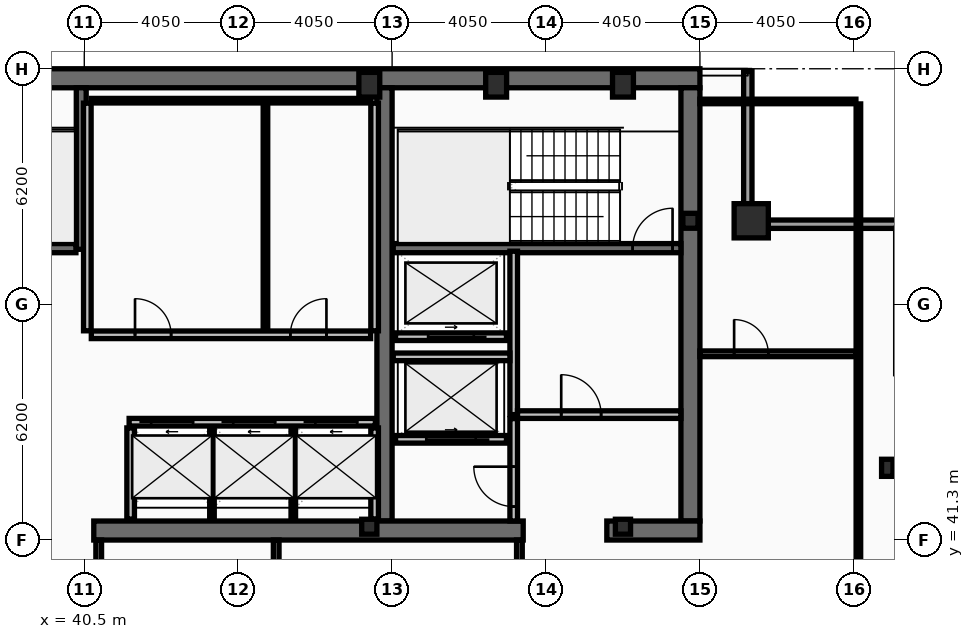
"""IFC4 building model, lengths in metres.
Left out: names, types, materials, properties, quantities, classifications, styles, units other than length and angle.
Written with IfcOpenShell. Run it as: python <this file> out.ifc"""

import sys

from ifc_helpers import new_model, si_unit, direction, frame, frame_2d, origin, origin_2d, place, context, subcontext, project, spatial, rectangle, hollow_rectangle, i_section, extrude, element, fill, save


model = new_model("IFC4")
c1 = context("Model", 3, precision=1e-05, world=origin(), true_north=direction((0.0, 1.0)))
c2 = subcontext(c1, "Body", "Model", "MODEL_VIEW")
j1 = project(units=[si_unit("LENGTHUNIT", "METRE"), si_unit("PLANEANGLEUNIT", "RADIAN")], contexts=[c1])
p1 = place(None, origin())
s1 = spatial("IfcSite", under=j1, at=p1, CompositionType="ELEMENT")
p2 = place(p1, origin())
s2 = spatial("IfcBuilding", under=s1, at=p2, CompositionType="ELEMENT")
p3 = place(p2, frame((0.0, 0.0, 343.4)))
s3 = spatial("IfcBuildingStorey", under=s2, at=p3, CompositionType="ELEMENT", Elevation=343.4)
p4 = place(p3, frame((16.2, 53.45, 0.0), z_axis=(0.0, 0.0, 1.0), x_axis=(1.0, 0.0, 0.0)))
e1 = element("IfcWall", 1, at=p4, inside=s3, PredefinedType="SHEAR", context=c2, shape_type="SweptSolid", body=[
    extrude(rectangle(XDim=40.5, YDim=0.5, at=frame_2d((20.25, 0.0))), origin(), (0.0, 0.0, 1.0), 3.44),
])
p5 = place(p3, frame((56.45, 53.2, 0.0), z_axis=(0.0, 0.0, 1.0), x_axis=(0.0, -1.0, 0.0)))
e2 = element("IfcWall", 2, at=p5, inside=s3, PredefinedType="SHEAR", context=c2, shape_type="SweptSolid", body=[
    extrude(rectangle(XDim=11.4, YDim=0.5, at=frame_2d((5.7, 0.0))), origin(), (0.0, 0.0, 1.0), 3.44),
])
p6 = place(p3, frame((48.4, 41.8, 0.0), z_axis=(0.0, 0.0, 1.0), x_axis=(0.0, 1.0, 0.0)))
e3 = element("IfcWall", 3, at=p6, inside=s3, PredefinedType="SHEAR", context=c2, shape_type="SweptSolid", body=[
    extrude(rectangle(XDim=11.4, YDim=0.4, at=frame_2d((5.7, 0.0))), origin(), (0.0, 0.0, 1.0), 3.44),
])
p7 = place(p3, frame((52.05, 41.55, 0.0), z_axis=(0.0, 0.0, 1.0), x_axis=(-1.0, 0.0, 0.0)))
e4 = element("IfcWall", 4, at=p7, inside=s3, PredefinedType="SHEAR", context=c2, shape_type="SweptSolid", body=[
    extrude(rectangle(XDim=11.3, YDim=0.5, at=frame_2d((5.65, 0.0))), origin(), (0.0, 0.0, 1.0), 3.44),
])
p8 = place(p3, frame((56.7, 41.55, 0.0), z_axis=(0.0, 0.0, 1.0), x_axis=(-1.0, 0.0, 0.0)))
e5 = element("IfcWall", 5, at=p8, inside=s3, PredefinedType="SHEAR", context=c2, shape_type="SweptSolid", body=[
    extrude(rectangle(XDim=2.45, YDim=0.5, at=frame_2d((1.225, 0.0))), origin(), (0.0, 0.0, 1.0), 3.44),
])
p9 = place(p3, frame((40.42, 48.95, 0.0), z_axis=(0.0, 0.0, 1.0), x_axis=(0.0, 1.0, 0.0)))
e6 = element("IfcWall", 6, at=p9, inside=s3, PredefinedType="SHEAR", context=c2, shape_type="SweptSolid", body=[
    extrude(rectangle(XDim=4.25, YDim=0.26, at=frame_2d((2.125, 0.0))), origin(), (0.0, 0.0, 1.0), 3.44),
])
p10 = place(p3, frame((48.63, 48.98, 0.0), z_axis=(0.0, 0.0, 1.0), x_axis=(1.0, 0.0, 0.0)))
e7 = element("IfcWall", 7, at=p10, inside=s3, PredefinedType="SHEAR", context=c2, shape_type="SweptSolid", body=[
    extrude(rectangle(XDim=7.57, YDim=0.24, at=frame_2d((3.785, 0.0))), origin(), (0.0, 0.0, 1.0), 3.44),
])
p11 = place(p10, frame((6.3, 0.0, 0.0)))
e8 = element("IfcOpeningElement", 8, at=p11, cuts=e7, PredefinedType="OPENING", context=c2, shape_type="SweptSolid", body=[
    extrude(rectangle(XDim=1.05, YDim=2.15, at=frame_2d((0.525, 1.075))), frame((0.0, 0.13, 0.0), z_axis=(0.0, -1.0, 0.0), x_axis=(1.0, 0.0, 0.0)), (0.0, 0.0, 1.0), 0.26),
])
p12 = place(p3, frame((32.72, 48.98, 0.0), z_axis=(0.0, 0.0, 1.0), x_axis=(1.0, 0.0, 0.0)))
e9 = element("IfcWall", 9, at=p12, inside=s3, PredefinedType="SHEAR", context=c2, shape_type="SweptSolid", body=[
    extrude(rectangle(XDim=7.56, YDim=0.24, at=frame_2d((3.78, 0.0))), origin(), (0.0, 0.0, 1.0), 3.44),
])
p13 = place(p12, frame((0.22, 0.0, 0.0)))
e10 = element("IfcOpeningElement", 10, at=p13, cuts=e9, PredefinedType="OPENING", context=c2, shape_type="SweptSolid", body=[
    extrude(rectangle(XDim=1.05, YDim=2.15, at=frame_2d((0.525, 1.075))), frame((0.0, 0.13, 0.0), z_axis=(0.0, -1.0, 0.0), x_axis=(1.0, 0.0, 0.0)), (0.0, 0.0, 1.0), 0.26),
])
p14 = place(p3, frame((58.05, 49.7, 0.0), z_axis=(0.0, 0.0, 1.0), x_axis=(1.0, 0.0, 0.0)))
e11 = element("IfcColumn", 11, at=p14, inside=s3, PredefinedType="COLUMN", context=c2, shape_type="SweptSolid", body=[
    extrude(hollow_rectangle(XDim=0.9, YDim=0.9, WallThickness=0.05, at=origin_2d()), origin(), (0.0, 0.0, 1.0), 3.6),
])
for number, where, z_axis, x_axis in (
    (12, (48.0, 53.28, 0.0), (0.0, 0.0, 1.0), (1.0, 0.0, 0.0)),
    (13, (51.337, 53.28, 0.0), (0.0, 0.0, 1.0), (1.0, 0.0, 0.0)),
    (14, (54.675, 53.28, 0.0), (0.0, 0.0, 1.0), (1.0, 0.0, 0.0)),
):
    element("IfcColumn", number, at=place(p3, frame(where, z_axis=z_axis, x_axis=x_axis)), inside=s3, PredefinedType="COLUMN", context=c2, shape_type="SweptSolid", body=[
        extrude(hollow_rectangle(XDim=0.55, YDim=0.65, WallThickness=0.04, at=origin_2d()), origin(), (0.0, 0.0, 1.0), 3.6),
    ])
p15 = place(p3, frame((61.63, 43.2, 0.0), z_axis=(0.0, 0.0, 1.0), x_axis=(1.0, 0.0, 0.0)))
e15 = element("IfcColumn", 15, at=p15, inside=s3, PredefinedType="COLUMN", context=c2, shape_type="SweptSolid", body=[
    extrude(i_section(OverallWidth=0.3, OverallDepth=0.45, WebThickness=0.014, FlangeThickness=0.026, at=origin_2d()), origin(), (0.0, 0.0, 1.0), 3.6),
])
for number, where, z_axis, x_axis in (
    (16, (56.45, 49.7, 0.0), (0.0, 0.0, 1.0), (1.0, 0.0, 0.0)),
    (17, (48.0, 41.65, 0.0), (0.0, 0.0, 1.0), (1.0, 0.0, 0.0)),
    (18, (54.675, 41.65, 0.0), (0.0, 0.0, 1.0), (1.0, 0.0, 0.0)),
):
    element("IfcColumn", number, at=place(p3, frame(where, z_axis=z_axis, x_axis=x_axis)), inside=s3, PredefinedType="COLUMN", context=c2, shape_type="SweptSolid", body=[
        extrude(i_section(OverallWidth=0.399, OverallDepth=0.393, WebThickness=0.023, FlangeThickness=0.037, at=origin_2d()), origin(), (0.0, 0.0, 1.0), 3.6),
    ])
p16 = place(p3, frame((57.96, 53.63, 0.0), z_axis=(0.0, 0.0, 1.0), x_axis=(0.0, -1.0, 0.0)))
e19 = element("IfcWall", 19, at=p16, inside=s3, PredefinedType="SOLIDWALL", context=c2, shape_type="SweptSolid", body=[
    extrude(rectangle(XDim=3.91, YDim=0.22, at=frame_2d((1.955, 0.0))), origin(), (0.0, 0.0, 1.0), 2.88),
])
p17 = place(p3, frame((57.85, 49.61, 0.0), z_axis=(0.0, 0.0, 1.0), x_axis=(1.0, 0.0, 0.0)))
e20 = element("IfcWall", 20, at=p17, inside=s3, PredefinedType="SOLIDWALL", context=c2, shape_type="SweptSolid", body=[
    extrude(rectangle(XDim=4.22, YDim=0.22, at=frame_2d((2.11, 0.0))), origin(), (0.0, 0.0, 1.0), 2.88),
])
p18 = place(p3, frame((41.68, 44.4, 0.0), z_axis=(0.0, 0.0, 1.0), x_axis=(1.0, 0.0, 0.0)))
e21 = element("IfcWall", 21, at=p18, inside=s3, PredefinedType="PARTITIONING", context=c2, shape_type="SweptSolid", body=[
    extrude(rectangle(XDim=6.48, YDim=0.2, at=frame_2d((3.24, 0.0))), origin(), (0.0, 0.0, 1.0), 3.44),
])
p19 = place(p18, frame((0.58, 0.0, 0.0)))
e22 = element("IfcOpeningElement", 22, at=p19, cuts=e21, PredefinedType="OPENING", context=c2, shape_type="SweptSolid", body=[
    extrude(rectangle(XDim=1.1, YDim=2.18, at=frame_2d((0.55, 1.09))), frame((0.0, 0.11, 0.0), z_axis=(0.0, -1.0, 0.0), x_axis=(1.0, 0.0, 0.0)), (0.0, 0.0, 1.0), 0.22),
])
p20 = place(p18, frame((2.74, 0.0, 0.0)))
e23 = element("IfcOpeningElement", 23, at=p20, cuts=e21, PredefinedType="OPENING", context=c2, shape_type="SweptSolid", body=[
    extrude(rectangle(XDim=1.1, YDim=2.18, at=frame_2d((0.55, 1.09))), frame((0.0, 0.11, 0.0), z_axis=(0.0, -1.0, 0.0), x_axis=(1.0, 0.0, 0.0)), (0.0, 0.0, 1.0), 0.22),
])
p21 = place(p18, frame((4.9, 0.0, 0.0)))
e24 = element("IfcOpeningElement", 24, at=p21, cuts=e21, PredefinedType="OPENING", context=c2, shape_type="SweptSolid", body=[
    extrude(rectangle(XDim=1.1, YDim=2.18, at=frame_2d((0.55, 1.09))), frame((0.0, 0.11, 0.0), z_axis=(0.0, -1.0, 0.0), x_axis=(1.0, 0.0, 0.0)), (0.0, 0.0, 1.0), 0.22),
])
p22 = place(p3, frame((51.61, 43.95, 0.0), z_axis=(0.0, 0.0, 1.0), x_axis=(-1.0, 0.0, 0.0)))
e25 = element("IfcWall", 25, at=p22, inside=s3, PredefinedType="PARTITIONING", context=c2, shape_type="SweptSolid", body=[
    extrude(rectangle(XDim=2.92, YDim=0.2, at=frame_2d((1.46, 0.0))), origin(), (0.0, 0.0, 1.0), 3.44),
])
p23 = place(p22, frame((0.81, 0.0, 0.0)))
e26 = element("IfcOpeningElement", 26, at=p23, cuts=e25, PredefinedType="OPENING", context=c2, shape_type="SweptSolid", body=[
    extrude(rectangle(XDim=1.3, YDim=2.18, at=frame_2d((0.65, 1.09))), frame((0.0, 0.11, 0.0), z_axis=(0.0, -1.0, 0.0), x_axis=(1.0, 0.0, 0.0)), (0.0, 0.0, 1.0), 0.22),
])
p24 = place(p3, frame((51.61, 46.65, 0.0), z_axis=(0.0, 0.0, 1.0), x_axis=(-1.0, 0.0, 0.0)))
e27 = element("IfcWall", 27, at=p24, inside=s3, PredefinedType="PARTITIONING", context=c2, shape_type="SweptSolid", body=[
    extrude(rectangle(XDim=2.92, YDim=0.2, at=frame_2d((1.46, 0.0))), origin(), (0.0, 0.0, 1.0), 3.44),
])
p25 = place(p24, frame((0.86, 0.0, 0.0)))
e28 = element("IfcOpeningElement", 28, at=p25, cuts=e27, PredefinedType="OPENING", context=c2, shape_type="SweptSolid", body=[
    extrude(rectangle(XDim=1.2, YDim=2.18, at=frame_2d((0.6, 1.09))), frame((0.0, 0.11, 0.0), z_axis=(0.0, -1.0, 0.0), x_axis=(1.0, 0.0, 0.0)), (0.0, 0.0, 1.0), 0.22),
])
p26 = place(p3, frame((51.8, 44.6, 0.0), z_axis=(0.0, 0.0, 1.0), x_axis=(0.0, 1.0, 0.0)))
e29 = element("IfcWall", 29, at=p26, inside=s3, PredefinedType="PARTITIONING", context=c2, shape_type="SweptSolid", body=[
    extrude(rectangle(XDim=4.3, YDim=0.2, at=frame_2d((2.15, 0.0))), origin(), (0.0, 0.0, 1.0), 3.44),
])
p27 = place(p3, frame((51.9, 44.6, 0.0), z_axis=(0.0, 0.0, 1.0), x_axis=(1.0, 0.0, 0.0)))
e30 = element("IfcWall", 30, at=p27, inside=s3, PredefinedType="PARTITIONING", context=c2, shape_type="SweptSolid", body=[
    extrude(rectangle(XDim=4.3, YDim=0.2, at=frame_2d((2.15, 0.0))), origin(), (0.0, 0.0, 1.0), 3.44),
])
p28 = place(p27, frame((1.15, 0.0, 0.0)))
e31 = element("IfcOpeningElement", 31, at=p28, cuts=e30, PredefinedType="OPENING", context=c2, shape_type="SweptSolid", body=[
    extrude(rectangle(XDim=1.05, YDim=2.15, at=frame_2d((0.525, 1.075))), frame((0.0, 0.11, 0.0), z_axis=(0.0, -1.0, 0.0), x_axis=(1.0, 0.0, 0.0)), (0.0, 0.0, 1.0), 0.22),
])
p29 = place(p3, frame((48.63, 46.12, 0.0), z_axis=(0.0, 0.0, 1.0), x_axis=(1.0, 0.0, 0.0)))
e32 = element("IfcWall", 32, at=p29, inside=s3, PredefinedType="PARTITIONING", context=c2, shape_type="SweptSolid", body=[
    extrude(rectangle(XDim=3.07, YDim=0.2, at=frame_2d((1.535, 0.0))), origin(), (0.0, 0.0, 1.0), 3.44),
])
p30 = place(p3, frame((51.8, 41.8, 0.0), z_axis=(0.0, 0.0, 1.0), x_axis=(0.0, 1.0, 0.0)))
e33 = element("IfcWall", 33, at=p30, inside=s3, PredefinedType="PARTITIONING", context=c2, shape_type="SweptSolid", body=[
    extrude(rectangle(XDim=2.695, YDim=0.2, at=frame_2d((1.348, 0.0))), origin(), (0.0, 0.0, 1.0), 3.44),
])
p31 = place(p30, frame((0.38, 0.0, 0.0)))
e34 = element("IfcOpeningElement", 34, at=p31, cuts=e33, PredefinedType="OPENING", context=c2, shape_type="SweptSolid", body=[
    extrude(rectangle(XDim=1.05, YDim=2.15, at=frame_2d((0.525, 1.075))), frame((0.0, 0.11, 0.0), z_axis=(0.0, -1.0, 0.0), x_axis=(1.0, 0.0, 0.0)), (0.0, 0.0, 1.0), 0.22),
])
for number, where, z_axis, x_axis in (
    (35, (40.58, 46.805, 0.0), (0.0, 0.0, 1.0), (0.0, 1.0, 0.0)),
    (36, (48.14, 46.805, 0.0), (0.0, 0.0, 1.0), (0.0, 1.0, 0.0)),
):
    element("IfcWall", number, at=place(p3, frame(where, z_axis=z_axis, x_axis=x_axis)), inside=s3, PredefinedType="PARTITIONING", context=c2, shape_type="SweptSolid", body=[
        extrude(rectangle(XDim=5.99, YDim=0.2, at=frame_2d((2.995, 0.0))), origin(), (0.0, 0.0, 1.0), 3.44),
    ])
p32 = place(p3, frame((40.685, 52.86, 0.0), z_axis=(0.0, 0.0, 1.0), x_axis=(1.0, 0.0, 0.0)))
e37 = element("IfcWall", 37, at=p32, inside=s3, PredefinedType="PARTITIONING", context=c2, shape_type="SweptSolid", body=[
    extrude(rectangle(XDim=7.35, YDim=0.12, at=frame_2d((3.675, 0.0))), origin(), (0.0, 0.0, 1.0), 3.44),
])
p33 = place(p3, frame((45.267, 46.805, 0.0), z_axis=(0.0, 0.0, 1.0), x_axis=(0.0, 1.0, 0.0)))
e38 = element("IfcWall", 38, at=p33, inside=s3, PredefinedType="PARTITIONING", context=c2, shape_type="SweptSolid", body=[
    extrude(rectangle(XDim=5.99, YDim=0.12, at=frame_2d((2.995, 0.0))), origin(), (0.0, 0.0, 1.0), 3.44),
])
p34 = place(p3, frame((40.685, 46.7, 0.0), z_axis=(0.0, 0.0, 1.0), x_axis=(1.0, 0.0, 0.0)))
e39 = element("IfcWall", 39, at=p34, inside=s3, PredefinedType="PARTITIONING", context=c2, shape_type="SweptSolid", body=[
    extrude(rectangle(XDim=7.35, YDim=0.2, at=frame_2d((3.675, 0.0))), origin(), (0.0, 0.0, 1.0), 3.44),
])
p35 = place(p34, frame((1.15, 0.0, 0.0)))
e40 = element("IfcOpeningElement", 40, at=p35, cuts=e39, PredefinedType="OPENING", context=c2, shape_type="SweptSolid", body=[
    extrude(rectangle(XDim=0.95, YDim=2.1, at=frame_2d((0.475, 1.05))), frame((0.0, 0.11, 0.0), z_axis=(0.0, -1.0, 0.0), x_axis=(1.0, 0.0, 0.0)), (0.0, 0.0, 1.0), 0.22),
])
p36 = place(p34, frame((5.237, 0.0, 0.0)))
e41 = element("IfcOpeningElement", 41, at=p36, cuts=e39, PredefinedType="OPENING", context=c2, shape_type="SweptSolid", body=[
    extrude(rectangle(XDim=0.95, YDim=2.1, at=frame_2d((0.475, 1.05))), frame((0.0, 0.11, 0.0), z_axis=(0.0, -1.0, 0.0), x_axis=(1.0, 0.0, 0.0)), (0.0, 0.0, 1.0), 0.22),
])
for number, where, z_axis, x_axis in (
    (42, (41.72, 41.85, 0.0), (0.0, 0.0, 1.0), (0.0, 1.0, 0.0)),
    (43, (48.14, 41.85, 0.0), (0.0, 0.0, 1.0), (0.0, 1.0, 0.0)),
):
    element("IfcWall", number, at=place(p3, frame(where, z_axis=z_axis, x_axis=x_axis)), inside=s3, PredefinedType="PARTITIONING", context=c2, shape_type="SweptSolid", body=[
        extrude(rectangle(XDim=2.4, YDim=0.2, at=frame_2d((1.2, 0.0))), origin(), (0.0, 0.0, 1.0), 3.44),
    ])
for number, where, z_axis, x_axis in (
    (44, (43.86, 41.85, 0.0), (0.0, 0.0, 1.0), (0.0, 1.0, 0.0)),
    (45, (46.0, 41.85, 0.0), (0.0, 0.0, 1.0), (0.0, 1.0, 0.0)),
):
    element("IfcWall", number, at=place(p3, frame(where, z_axis=z_axis, x_axis=x_axis)), inside=s3, PredefinedType="PARTITIONING", context=c2, shape_type="SweptSolid", body=[
        extrude(rectangle(XDim=2.4, YDim=0.12, at=frame_2d((1.2, 0.0))), origin(), (0.0, 0.0, 1.0), 3.44),
    ])
for number, where, z_axis, x_axis in (
    (46, (40.88, 38.28, 0.0), (0.0, 0.0, 1.0), (0.0, 1.0, 0.0)),
    (47, (45.55, 38.28, 0.0), (0.0, 0.0, 1.0), (0.0, 1.0, 0.0)),
    (48, (51.95, 38.28, 0.0), (0.0, 0.0, 1.0), (0.0, 1.0, 0.0)),
):
    element("IfcWall", number, at=place(p3, frame(where, z_axis=z_axis, x_axis=x_axis)), inside=s3, PredefinedType="PARTITIONING", context=c2, shape_type="SweptSolid", body=[
        extrude(rectangle(XDim=3.02, YDim=0.15, at=frame_2d((1.51, 0.0))), origin(), (0.0, 0.0, 1.0), 3.44),
    ])
p37 = place(p3, frame((56.7, 46.2, 0.0), z_axis=(0.0, 0.0, 1.0), x_axis=(1.0, 0.0, 0.0)))
e49 = element("IfcWall", 49, at=p37, inside=s3, PredefinedType="PARTITIONING", context=c2, shape_type="SweptSolid", body=[
    extrude(rectangle(XDim=4.105, YDim=0.15, at=frame_2d((2.052, 0.0))), origin(), (0.0, 0.0, 1.0), 2.88),
])
p38 = place(p37, frame((0.9, 0.0, 0.0)))
e50 = element("IfcOpeningElement", 50, at=p38, cuts=e49, PredefinedType="OPENING", context=c2, shape_type="SweptSolid", body=[
    extrude(rectangle(XDim=0.9, YDim=2.05, at=frame_2d((0.45, 1.025))), frame((0.0, 0.085, 0.0), z_axis=(0.0, -1.0, 0.0), x_axis=(1.0, 0.0, 0.0)), (0.0, 0.0, 1.0), 0.17),
])
p39 = place(p3, frame((60.87, 10.665, 0.0), z_axis=(0.0, 0.0, 1.0), x_axis=(0.0, 1.0, 0.0)))
e51 = element("IfcWall", 51, at=p39, inside=s3, PredefinedType="PARTITIONING", context=c2, shape_type="SweptSolid", body=[
    extrude(rectangle(XDim=42.11, YDim=0.12, at=frame_2d((21.055, 0.0))), origin(), (0.0, 0.0, 1.0), 2.83),
])
p40 = place(p3, frame((56.7, 52.84, 0.0), z_axis=(0.0, 0.0, 1.0), x_axis=(1.0, 0.0, 0.0)))
e52 = element("IfcWall", 52, at=p40, inside=s3, PredefinedType="PARTITIONING", context=c2, shape_type="SweptSolid", body=[
    extrude(rectangle(XDim=4.105, YDim=0.12, at=frame_2d((2.052, 0.0))), origin(), (0.0, 0.0, 1.0), 3.44),
])
p41 = place(p11, origin())
e53 = element("IfcDoor", 53, at=p41, inside=s3, OperationType="SINGLE_SWING_RIGHT", PredefinedType="DOOR", context=c2, shape_type="SweptSolid", body=[
    extrude(rectangle(XDim=1.05, YDim=2.15, at=frame_2d((0.525, 1.075))), frame((0.0, 0.025, 0.0), z_axis=(0.0, -1.0, 0.0), x_axis=(1.0, 0.0, 0.0)), (0.0, 0.0, 1.0), 0.05),
])
fill(e8, e53)
p42 = place(p19, origin())
e54 = element("IfcDoor", 54, at=p42, inside=s3, OperationType="SLIDING_TO_LEFT", PredefinedType="DOOR", context=c2, shape_type="SweptSolid", body=[
    extrude(rectangle(XDim=1.1, YDim=2.18, at=frame_2d((0.55, 1.09))), frame((0.0, 0.025, 0.0), z_axis=(0.0, -1.0, 0.0), x_axis=(1.0, 0.0, 0.0)), (0.0, 0.0, 1.0), 0.05),
])
fill(e22, e54)
p43 = place(p20, origin())
e55 = element("IfcDoor", 55, at=p43, inside=s3, OperationType="SLIDING_TO_LEFT", PredefinedType="DOOR", context=c2, shape_type="SweptSolid", body=[
    extrude(rectangle(XDim=1.1, YDim=2.18, at=frame_2d((0.55, 1.09))), frame((0.0, 0.025, 0.0), z_axis=(0.0, -1.0, 0.0), x_axis=(1.0, 0.0, 0.0)), (0.0, 0.0, 1.0), 0.05),
])
fill(e23, e55)
p44 = place(p21, origin())
e56 = element("IfcDoor", 56, at=p44, inside=s3, OperationType="SLIDING_TO_LEFT", PredefinedType="DOOR", context=c2, shape_type="SweptSolid", body=[
    extrude(rectangle(XDim=1.1, YDim=2.18, at=frame_2d((0.55, 1.09))), frame((0.0, 0.025, 0.0), z_axis=(0.0, -1.0, 0.0), x_axis=(1.0, 0.0, 0.0)), (0.0, 0.0, 1.0), 0.05),
])
fill(e24, e56)
p45 = place(p23, origin())
e57 = element("IfcDoor", 57, at=p45, inside=s3, OperationType="SLIDING_TO_LEFT", PredefinedType="DOOR", context=c2, shape_type="SweptSolid", body=[
    extrude(rectangle(XDim=1.3, YDim=2.18, at=frame_2d((0.65, 1.09))), frame((0.0, 0.025, 0.0), z_axis=(0.0, -1.0, 0.0), x_axis=(1.0, 0.0, 0.0)), (0.0, 0.0, 1.0), 0.05),
])
fill(e26, e57)
p46 = place(p25, origin())
e58 = element("IfcDoor", 58, at=p46, inside=s3, OperationType="SLIDING_TO_LEFT", PredefinedType="DOOR", context=c2, shape_type="SweptSolid", body=[
    extrude(rectangle(XDim=1.2, YDim=2.18, at=frame_2d((0.6, 1.09))), frame((0.0, 0.025, 0.0), z_axis=(0.0, -1.0, 0.0), x_axis=(1.0, 0.0, 0.0)), (0.0, 0.0, 1.0), 0.05),
])
fill(e28, e58)
p47 = place(p28, origin())
e59 = element("IfcDoor", 59, at=p47, inside=s3, OperationType="SINGLE_SWING_LEFT", PredefinedType="DOOR", context=c2, shape_type="SweptSolid", body=[
    extrude(rectangle(XDim=1.05, YDim=2.15, at=frame_2d((0.525, 1.075))), frame((0.0, 0.025, 0.0), z_axis=(0.0, -1.0, 0.0), x_axis=(1.0, 0.0, 0.0)), (0.0, 0.0, 1.0), 0.05),
])
fill(e31, e59)
p48 = place(p31, origin())
e60 = element("IfcDoor", 60, at=p48, inside=s3, OperationType="SINGLE_SWING_RIGHT", PredefinedType="DOOR", context=c2, shape_type="SweptSolid", body=[
    extrude(rectangle(XDim=1.05, YDim=2.15, at=frame_2d((0.525, 1.075))), frame((0.0, 0.025, 0.0), z_axis=(0.0, -1.0, 0.0), x_axis=(1.0, 0.0, 0.0)), (0.0, 0.0, 1.0), 0.05),
])
fill(e34, e60)
p49 = place(p35, origin())
e61 = element("IfcDoor", 61, at=p49, inside=s3, OperationType="SINGLE_SWING_LEFT", PredefinedType="DOOR", context=c2, shape_type="SweptSolid", body=[
    extrude(rectangle(XDim=0.95, YDim=2.1, at=frame_2d((0.475, 1.05))), frame((0.0, 0.025, 0.0), z_axis=(0.0, -1.0, 0.0), x_axis=(1.0, 0.0, 0.0)), (0.0, 0.0, 1.0), 0.05),
])
fill(e40, e61)
p50 = place(p36, origin())
e62 = element("IfcDoor", 62, at=p50, inside=s3, OperationType="SINGLE_SWING_RIGHT", PredefinedType="DOOR", context=c2, shape_type="SweptSolid", body=[
    extrude(rectangle(XDim=0.95, YDim=2.1, at=frame_2d((0.475, 1.05))), frame((0.0, 0.025, 0.0), z_axis=(0.0, -1.0, 0.0), x_axis=(1.0, 0.0, 0.0)), (0.0, 0.0, 1.0), 0.05),
])
fill(e41, e62)
p51 = place(p38, origin())
e63 = element("IfcDoor", 63, at=p51, inside=s3, OperationType="SINGLE_SWING_LEFT", PredefinedType="DOOR", context=c2, shape_type="SweptSolid", body=[
    extrude(rectangle(XDim=0.9, YDim=2.05, at=frame_2d((0.45, 1.025))), frame((0.0, 0.025, 0.0), z_axis=(0.0, -1.0, 0.0), x_axis=(1.0, 0.0, 0.0)), (0.0, 0.0, 1.0), 0.05),
])
fill(e50, e63)
save(model, sys.argv[1])
